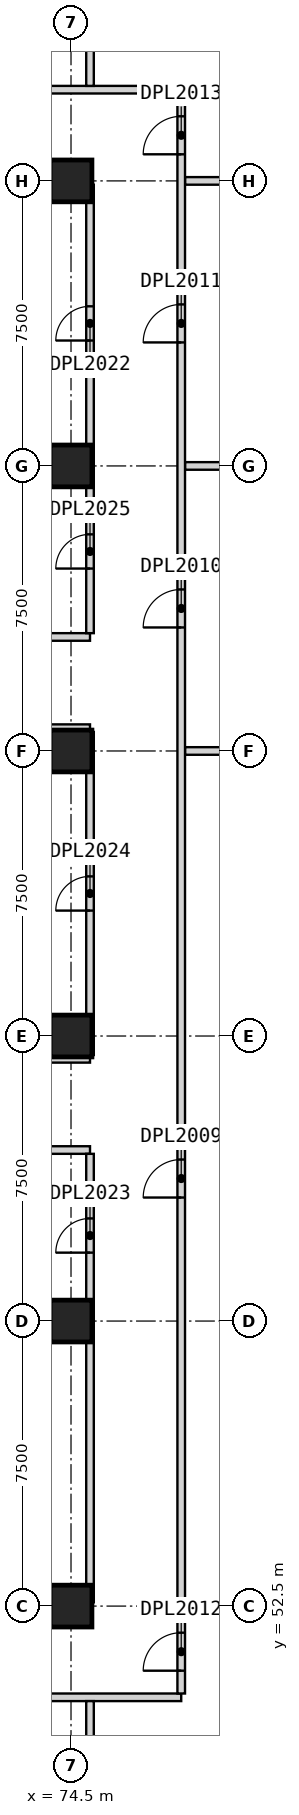
"""IFC4 building model, lengths in metres.
Left out: names, types, materials, properties, quantities, classifications, styles, units other than length and angle.
Written with IfcOpenShell. Run it as: python <this file> out.ifc"""

import sys

from ifc_helpers import new_model, si_unit, direction, frame, frame_2d, origin, origin_2d, place, context, subcontext, project, spatial, rectangle, extrude, element, fill, save


model = new_model("IFC4")
c1 = context("Model", 3, precision=1e-05, world=origin(), true_north=direction((0.0, 1.0)))
c2 = subcontext(c1, "Body", "Model", "MODEL_VIEW")
j1 = project(units=[si_unit("LENGTHUNIT", "METRE"), si_unit("PLANEANGLEUNIT", "RADIAN")], contexts=[c1])
p1 = place(None, origin())
s1 = spatial("IfcSite", under=j1, at=p1, CompositionType="ELEMENT")
p2 = place(p1, origin())
s2 = spatial("IfcBuilding", under=s1, at=p2, CompositionType="ELEMENT")
p3 = place(p2, frame((0.0, 0.0, 118.7)))
s3 = spatial("IfcBuildingStorey", under=s2, at=p3, CompositionType="ELEMENT", Elevation=118.7)
for number, where, z_axis, x_axis in (
    (1, (74.5, 52.5, 0.0), (0.0, 0.0, 1.0), (1.0, 0.0, 0.0)),
    (2, (74.5, 60.0, 0.0), (0.0, 0.0, 1.0), (1.0, 0.0, 0.0)),
    (3, (74.5, 67.5, 0.0), (0.0, 0.0, 1.0), (1.0, 0.0, 0.0)),
    (4, (74.5, 75.0, 0.0), (0.0, 0.0, 1.0), (1.0, 0.0, 0.0)),
    (5, (74.5, 82.5, 0.0), (0.0, 0.0, 1.0), (1.0, 0.0, 0.0)),
    (6, (74.5, 90.0, 0.0), (0.0, 0.0, 1.0), (1.0, 0.0, 0.0)),
):
    element("IfcColumn", number, at=place(p3, frame(where, z_axis=z_axis, x_axis=x_axis)), inside=s3, PredefinedType="COLUMN", context=c2, shape_type="SweptSolid", body=[
        extrude(rectangle(XDim=1.1, YDim=1.1, at=origin_2d()), origin(), (0.0, 0.0, 1.0), 5.5),
    ])
p4 = place(p3, frame((30.81, 50.1, 0.0), z_axis=(0.0, 0.0, 1.0), x_axis=(1.0, 0.0, 0.0)))
e7 = element("IfcWall", 7, at=p4, inside=s3, PredefinedType="PARTITIONING", context=c2, shape_type="SweptSolid", body=[
    extrude(rectangle(XDim=46.59, YDim=0.2, at=frame_2d((23.295, 0.0))), origin(), (0.0, 0.0, 1.0), 5.2),
])
p5 = place(p4, frame((8.065, 0.0, 0.0)))
e8 = element("IfcOpeningElement", 8, at=p5, cuts=e7, PredefinedType="OPENING", context=c2, shape_type="SweptSolid", body=[
    extrude(rectangle(XDim=1.0, YDim=2.1, at=frame_2d((0.5, 1.05))), frame((0.0, 0.11, 0.0), z_axis=(0.0, -1.0, 0.0), x_axis=(1.0, 0.0, 0.0)), (0.0, 0.0, 1.0), 0.22),
])
p6 = place(p4, frame((15.565, 0.0, 0.0)))
e9 = element("IfcOpeningElement", 9, at=p6, cuts=e7, PredefinedType="OPENING", context=c2, shape_type="SweptSolid", body=[
    extrude(rectangle(XDim=1.0, YDim=2.1, at=frame_2d((0.5, 1.05))), frame((0.0, 0.11, 0.0), z_axis=(0.0, -1.0, 0.0), x_axis=(1.0, 0.0, 0.0)), (0.0, 0.0, 1.0), 0.22),
])
p7 = place(p4, frame((24.94, 0.0, 0.0)))
e10 = element("IfcOpeningElement", 10, at=p7, cuts=e7, PredefinedType="OPENING", context=c2, shape_type="SweptSolid", body=[
    extrude(rectangle(XDim=1.0, YDim=2.1, at=frame_2d((0.5, 1.05))), frame((0.0, 0.11, 0.0), z_axis=(0.0, -1.0, 0.0), x_axis=(1.0, 0.0, 0.0)), (0.0, 0.0, 1.0), 0.22),
])
p8 = place(p4, frame((38.065, 0.0, 0.0)))
e11 = element("IfcOpeningElement", 11, at=p8, cuts=e7, PredefinedType="OPENING", context=c2, shape_type="SweptSolid", body=[
    extrude(rectangle(XDim=1.0, YDim=2.1, at=frame_2d((0.5, 1.05))), frame((0.0, 0.11, 0.0), z_axis=(0.0, -1.0, 0.0), x_axis=(1.0, 0.0, 0.0)), (0.0, 0.0, 1.0), 0.22),
])
p9 = place(p3, frame((60.0, 52.5, 0.0), z_axis=(0.0, 0.0, 1.0), x_axis=(1.0, 0.0, 0.0)))
e12 = element("IfcWall", 12, at=p9, inside=s3, PredefinedType="PARTITIONING", context=c2, shape_type="SweptSolid", body=[
    extrude(rectangle(XDim=15.0, YDim=0.2, at=frame_2d((7.5, 0.0))), origin(), (0.0, 0.0, 1.0), 5.2),
])
p10 = place(p9, frame((2.925, 0.0, 0.0)))
e13 = element("IfcOpeningElement", 13, at=p10, cuts=e12, PredefinedType="OPENING", context=c2, shape_type="SweptSolid", body=[
    extrude(rectangle(XDim=0.9, YDim=2.1, at=frame_2d((0.45, 1.05))), frame((0.0, 0.11, 0.0), z_axis=(0.0, -1.0, 0.0), x_axis=(1.0, 0.0, 0.0)), (0.0, 0.0, 1.0), 0.22),
])
p11 = place(p9, frame((11.525, 0.0, 0.0)))
e14 = element("IfcOpeningElement", 14, at=p11, cuts=e12, PredefinedType="OPENING", context=c2, shape_type="SweptSolid", body=[
    extrude(rectangle(XDim=0.9, YDim=2.1, at=frame_2d((0.45, 1.05))), frame((0.0, 0.11, 0.0), z_axis=(0.0, -1.0, 0.0), x_axis=(1.0, 0.0, 0.0)), (0.0, 0.0, 1.0), 0.22),
])
p12 = place(p3, frame((77.5, 52.5, 0.0), z_axis=(0.0, 0.0, 1.0), x_axis=(1.0, 0.0, 0.0)))
e15 = element("IfcWall", 15, at=p12, inside=s3, PredefinedType="PARTITIONING", context=c2, shape_type="SweptSolid", body=[
    extrude(rectangle(XDim=12.5, YDim=0.2, at=frame_2d((6.25, 0.0))), origin(), (0.0, 0.0, 1.0), 4.0),
])
p13 = place(p3, frame((60.0, 60.0, 0.0), z_axis=(0.0, 0.0, 1.0), x_axis=(1.0, 0.0, 0.0)))
e16 = element("IfcWall", 16, at=p13, inside=s3, PredefinedType="PARTITIONING", context=c2, shape_type="SweptSolid", body=[
    extrude(rectangle(XDim=14.9, YDim=0.2, at=frame_2d((7.45, 0.0))), origin(), (0.0, 0.0, 1.0), 5.2),
])
for number, where, z_axis, x_axis in (
    (17, (60.0, 64.5, 0.0), (0.0, 0.0, 1.0), (1.0, 0.0, 0.0)),
    (18, (60.0, 66.9, 0.0), (0.0, 0.0, 1.0), (1.0, 0.0, 0.0)),
):
    element("IfcWall", number, at=place(p3, frame(where, z_axis=z_axis, x_axis=x_axis)), inside=s3, PredefinedType="PARTITIONING", context=c2, shape_type="SweptSolid", body=[
        extrude(rectangle(XDim=15.0, YDim=0.2, at=frame_2d((7.5, 0.0))), origin(), (0.0, 0.0, 1.0), 5.2),
    ])
p14 = place(p3, frame((77.5, 75.0, 0.0), z_axis=(0.0, 0.0, 1.0), x_axis=(1.0, 0.0, 0.0)))
e19 = element("IfcWall", 19, at=p14, inside=s3, PredefinedType="PARTITIONING", context=c2, shape_type="SweptSolid", body=[
    extrude(rectangle(XDim=12.5, YDim=0.2, at=frame_2d((6.25, 0.0))), origin(), (0.0, 0.0, 1.0), 4.0),
])
for number, where, z_axis, x_axis in (
    (20, (60.0, 75.6, 0.0), (0.0, 0.0, 1.0), (1.0, 0.0, 0.0)),
    (21, (60.0, 78.0, 0.0), (0.0, 0.0, 1.0), (1.0, 0.0, 0.0)),
):
    element("IfcWall", number, at=place(p3, frame(where, z_axis=z_axis, x_axis=x_axis)), inside=s3, PredefinedType="PARTITIONING", context=c2, shape_type="SweptSolid", body=[
        extrude(rectangle(XDim=15.0, YDim=0.2, at=frame_2d((7.5, 0.0))), origin(), (0.0, 0.0, 1.0), 5.2),
    ])
p15 = place(p3, frame((60.0, 82.5, 0.0), z_axis=(0.0, 0.0, 1.0), x_axis=(1.0, 0.0, 0.0)))
e22 = element("IfcWall", 22, at=p15, inside=s3, PredefinedType="PARTITIONING", context=c2, shape_type="SweptSolid", body=[
    extrude(rectangle(XDim=14.9, YDim=0.2, at=frame_2d((7.45, 0.0))), origin(), (0.0, 0.0, 1.0), 5.2),
])
p16 = place(p3, frame((77.5, 82.5, 0.0), z_axis=(0.0, 0.0, 1.0), x_axis=(1.0, 0.0, 0.0)))
e23 = element("IfcWall", 23, at=p16, inside=s3, PredefinedType="PARTITIONING", context=c2, shape_type="SweptSolid", body=[
    extrude(rectangle(XDim=12.5, YDim=0.2, at=frame_2d((6.25, 0.0))), origin(), (0.0, 0.0, 1.0), 4.0),
])
p17 = place(p3, frame((30.0, 90.0, 0.0), z_axis=(0.0, 0.0, 1.0), x_axis=(1.0, 0.0, 0.0)))
e24 = element("IfcWall", 24, at=p17, inside=s3, PredefinedType="PARTITIONING", context=c2, shape_type="SweptSolid", body=[
    extrude(rectangle(XDim=45.0, YDim=0.2, at=frame_2d((22.5, 0.0))), origin(), (0.0, 0.0, 1.0), 5.2),
])
p18 = place(p17, frame((11.175, 0.0, 0.0)))
e25 = element("IfcOpeningElement", 25, at=p18, cuts=e24, PredefinedType="OPENING", context=c2, shape_type="SweptSolid", body=[
    extrude(rectangle(XDim=0.9, YDim=2.1, at=frame_2d((0.45, 1.05))), frame((0.0, 0.11, 0.0), z_axis=(0.0, -1.0, 0.0), x_axis=(1.0, 0.0, 0.0)), (0.0, 0.0, 1.0), 0.22),
])
p19 = place(p17, frame((24.6, 0.0, 0.0)))
e26 = element("IfcOpeningElement", 26, at=p19, cuts=e24, PredefinedType="OPENING", context=c2, shape_type="SweptSolid", body=[
    extrude(rectangle(XDim=0.9, YDim=2.1, at=frame_2d((0.45, 1.05))), frame((0.0, 0.11, 0.0), z_axis=(0.0, -1.0, 0.0), x_axis=(1.0, 0.0, 0.0)), (0.0, 0.0, 1.0), 0.22),
])
p20 = place(p17, frame((32.1, 0.0, 0.0)))
e27 = element("IfcOpeningElement", 27, at=p20, cuts=e24, PredefinedType="OPENING", context=c2, shape_type="SweptSolid", body=[
    extrude(rectangle(XDim=0.9, YDim=2.1, at=frame_2d((0.45, 1.05))), frame((0.0, 0.11, 0.0), z_axis=(0.0, -1.0, 0.0), x_axis=(1.0, 0.0, 0.0)), (0.0, 0.0, 1.0), 0.22),
])
p21 = place(p3, frame((77.5, 90.0, 0.0), z_axis=(0.0, 0.0, 1.0), x_axis=(1.0, 0.0, 0.0)))
e28 = element("IfcWall", 28, at=p21, inside=s3, PredefinedType="PARTITIONING", context=c2, shape_type="SweptSolid", body=[
    extrude(rectangle(XDim=12.5, YDim=0.2, at=frame_2d((6.25, 0.0))), origin(), (0.0, 0.0, 1.0), 4.0),
])
p22 = place(p3, frame((30.81, 92.4, 0.0), z_axis=(0.0, 0.0, 1.0), x_axis=(1.0, 0.0, 0.0)))
e29 = element("IfcWall", 29, at=p22, inside=s3, PredefinedType="PARTITIONING", context=c2, shape_type="SweptSolid", body=[
    extrude(rectangle(XDim=46.59, YDim=0.2, at=frame_2d((23.295, 0.0))), origin(), (0.0, 0.0, 1.0), 5.2),
])
p23 = place(p22, frame((6.19, 0.0, 0.0)))
e30 = element("IfcOpeningElement", 30, at=p23, cuts=e29, PredefinedType="OPENING", context=c2, shape_type="SweptSolid", body=[
    extrude(rectangle(XDim=1.0, YDim=2.1, at=frame_2d((0.5, 1.05))), frame((0.0, 0.11, 0.0), z_axis=(0.0, -1.0, 0.0), x_axis=(1.0, 0.0, 0.0)), (0.0, 0.0, 1.0), 0.22),
])
p24 = place(p22, frame((15.565, 0.0, 0.0)))
e31 = element("IfcOpeningElement", 31, at=p24, cuts=e29, PredefinedType="OPENING", context=c2, shape_type="SweptSolid", body=[
    extrude(rectangle(XDim=1.0, YDim=2.1, at=frame_2d((0.5, 1.05))), frame((0.0, 0.11, 0.0), z_axis=(0.0, -1.0, 0.0), x_axis=(1.0, 0.0, 0.0)), (0.0, 0.0, 1.0), 0.22),
])
p25 = place(p22, frame((23.065, 0.0, 0.0)))
e32 = element("IfcOpeningElement", 32, at=p25, cuts=e29, PredefinedType="OPENING", context=c2, shape_type="SweptSolid", body=[
    extrude(rectangle(XDim=1.0, YDim=2.1, at=frame_2d((0.5, 1.05))), frame((0.0, 0.11, 0.0), z_axis=(0.0, -1.0, 0.0), x_axis=(1.0, 0.0, 0.0)), (0.0, 0.0, 1.0), 0.22),
])
p26 = place(p22, frame((36.19, 0.0, 0.0)))
e33 = element("IfcOpeningElement", 33, at=p26, cuts=e29, PredefinedType="OPENING", context=c2, shape_type="SweptSolid", body=[
    extrude(rectangle(XDim=1.0, YDim=2.1, at=frame_2d((0.5, 1.05))), frame((0.0, 0.11, 0.0), z_axis=(0.0, -1.0, 0.0), x_axis=(1.0, 0.0, 0.0)), (0.0, 0.0, 1.0), 0.22),
])
p27 = place(p3, frame((75.0, 38.31, 0.0), z_axis=(0.0, 0.0, 1.0), x_axis=(0.0, 1.0, 0.0)))
e34 = element("IfcWall", 34, at=p27, inside=s3, PredefinedType="PARTITIONING", context=c2, shape_type="SweptSolid", body=[
    extrude(rectangle(XDim=11.69, YDim=0.2, at=frame_2d((5.845, 0.0))), origin(), (0.0, 0.0, 1.0), 5.2),
])
p28 = place(p3, frame((75.0, 52.6, 0.0), z_axis=(0.0, 0.0, 1.0), x_axis=(0.0, 1.0, 0.0)))
e35 = element("IfcWall", 35, at=p28, inside=s3, PredefinedType="PARTITIONING", context=c2, shape_type="SweptSolid", body=[
    extrude(rectangle(XDim=11.8, YDim=0.2, at=frame_2d((5.9, 0.0))), origin(), (0.0, 0.0, 1.0), 5.2),
])
p29 = place(p28, frame((9.2, 0.0, 0.0)))
e36 = element("IfcOpeningElement", 36, at=p29, cuts=e35, PredefinedType="OPENING", context=c2, shape_type="SweptSolid", body=[
    extrude(rectangle(XDim=0.9, YDim=2.1, at=frame_2d((0.45, 1.05))), frame((0.0, 0.11, 0.0), z_axis=(0.0, -1.0, 0.0), x_axis=(1.0, 0.0, 0.0)), (0.0, 0.0, 1.0), 0.22),
])
p30 = place(p3, frame((75.0, 67.0, 0.0), z_axis=(0.0, 0.0, 1.0), x_axis=(0.0, 1.0, 0.0)))
e37 = element("IfcWall", 37, at=p30, inside=s3, PredefinedType="PARTITIONING", context=c2, shape_type="SweptSolid", body=[
    extrude(rectangle(XDim=8.5, YDim=0.2, at=frame_2d((4.25, 0.0))), origin(), (0.0, 0.0, 1.0), 5.2),
])
p31 = place(p30, frame((3.8, 0.0, 0.0)))
e38 = element("IfcOpeningElement", 38, at=p31, cuts=e37, PredefinedType="OPENING", context=c2, shape_type="SweptSolid", body=[
    extrude(rectangle(XDim=0.9, YDim=2.1, at=frame_2d((0.45, 1.05))), frame((0.0, 0.11, 0.0), z_axis=(0.0, -1.0, 0.0), x_axis=(1.0, 0.0, 0.0)), (0.0, 0.0, 1.0), 0.22),
])
p32 = place(p3, frame((75.0, 78.1, 0.0), z_axis=(0.0, 0.0, 1.0), x_axis=(0.0, 1.0, 0.0)))
e39 = element("IfcWall", 39, at=p32, inside=s3, PredefinedType="PARTITIONING", context=c2, shape_type="SweptSolid", body=[
    extrude(rectangle(XDim=11.8, YDim=0.2, at=frame_2d((5.9, 0.0))), origin(), (0.0, 0.0, 1.0), 5.2),
])
p33 = place(p32, frame((7.7, 0.0, 0.0)))
e40 = element("IfcOpeningElement", 40, at=p33, cuts=e39, PredefinedType="OPENING", context=c2, shape_type="SweptSolid", body=[
    extrude(rectangle(XDim=0.9, YDim=2.1, at=frame_2d((0.45, 1.05))), frame((0.0, 0.11, 0.0), z_axis=(0.0, -1.0, 0.0), x_axis=(1.0, 0.0, 0.0)), (0.0, 0.0, 1.0), 0.22),
])
p34 = place(p32, frame((1.7, 0.0, 0.0)))
e41 = element("IfcOpeningElement", 41, at=p34, cuts=e39, PredefinedType="OPENING", context=c2, shape_type="SweptSolid", body=[
    extrude(rectangle(XDim=0.9, YDim=2.1, at=frame_2d((0.45, 1.05))), frame((0.0, 0.11, 0.0), z_axis=(0.0, -1.0, 0.0), x_axis=(1.0, 0.0, 0.0)), (0.0, 0.0, 1.0), 0.22),
])
p35 = place(p3, frame((75.0, 92.5, 0.0), z_axis=(0.0, 0.0, 1.0), x_axis=(0.0, 1.0, 0.0)))
e42 = element("IfcWall", 42, at=p35, inside=s3, PredefinedType="PARTITIONING", context=c2, shape_type="SweptSolid", body=[
    extrude(rectangle(XDim=11.69, YDim=0.2, at=frame_2d((5.845, 0.0))), origin(), (0.0, 0.0, 1.0), 4.0),
])
p36 = place(p3, frame((77.4, 50.2, 0.0), z_axis=(0.0, 0.0, 1.0), x_axis=(0.0, 1.0, 0.0)))
e43 = element("IfcWall", 43, at=p36, inside=s3, PredefinedType="PARTITIONING", context=c2, shape_type="SweptSolid", body=[
    extrude(rectangle(XDim=42.1, YDim=0.2, at=frame_2d((21.05, 0.0))), origin(), (0.0, 0.0, 1.0), 5.2),
])
p37 = place(p36, frame((13.05, 0.0, 0.0)))
e44 = element("IfcOpeningElement", 44, at=p37, cuts=e43, PredefinedType="OPENING", context=c2, shape_type="SweptSolid", body=[
    extrude(rectangle(XDim=1.0, YDim=2.1, at=frame_2d((0.5, 1.05))), frame((0.0, 0.11, 0.0), z_axis=(0.0, -1.0, 0.0), x_axis=(1.0, 0.0, 0.0)), (0.0, 0.0, 1.0), 0.22),
])
p38 = place(p36, frame((28.05, 0.0, 0.0)))
e45 = element("IfcOpeningElement", 45, at=p38, cuts=e43, PredefinedType="OPENING", context=c2, shape_type="SweptSolid", body=[
    extrude(rectangle(XDim=1.0, YDim=2.1, at=frame_2d((0.5, 1.05))), frame((0.0, 0.11, 0.0), z_axis=(0.0, -1.0, 0.0), x_axis=(1.0, 0.0, 0.0)), (0.0, 0.0, 1.0), 0.22),
])
p39 = place(p36, frame((35.55, 0.0, 0.0)))
e46 = element("IfcOpeningElement", 46, at=p39, cuts=e43, PredefinedType="OPENING", context=c2, shape_type="SweptSolid", body=[
    extrude(rectangle(XDim=1.0, YDim=2.1, at=frame_2d((0.5, 1.05))), frame((0.0, 0.11, 0.0), z_axis=(0.0, -1.0, 0.0), x_axis=(1.0, 0.0, 0.0)), (0.0, 0.0, 1.0), 0.22),
])
p40 = place(p36, frame((0.6, 0.0, 0.0)))
e47 = element("IfcOpeningElement", 47, at=p40, cuts=e43, PredefinedType="OPENING", context=c2, shape_type="SweptSolid", body=[
    extrude(rectangle(XDim=1.0, YDim=2.1, at=frame_2d((0.5, 1.05))), frame((0.0, 0.11, 0.0), z_axis=(0.0, -1.0, 0.0), x_axis=(1.0, 0.0, 0.0)), (0.0, 0.0, 1.0), 0.22),
])
p41 = place(p36, frame((40.5, 0.0, 0.0)))
e48 = element("IfcOpeningElement", 48, at=p41, cuts=e43, PredefinedType="OPENING", context=c2, shape_type="SweptSolid", body=[
    extrude(rectangle(XDim=1.0, YDim=2.1, at=frame_2d((0.5, 1.05))), frame((0.0, 0.11, 0.0), z_axis=(0.0, -1.0, 0.0), x_axis=(1.0, 0.0, 0.0)), (0.0, 0.0, 1.0), 0.22),
])
p42 = place(p37, origin())
e49 = element("IfcDoor", 49, at=p42, inside=s3, OperationType="SINGLE_SWING_RIGHT", PredefinedType="DOOR", context=c2, shape_type="SweptSolid", body=[
    extrude(rectangle(XDim=1.0, YDim=2.1, at=frame_2d((0.5, 1.05))), frame((0.0, 0.025, 0.0), z_axis=(0.0, -1.0, 0.0), x_axis=(1.0, 0.0, 0.0)), (0.0, 0.0, 1.0), 0.05),
])
fill(e44, e49)
p43 = place(p38, origin())
e50 = element("IfcDoor", 50, at=p43, inside=s3, OperationType="SINGLE_SWING_RIGHT", PredefinedType="DOOR", context=c2, shape_type="SweptSolid", body=[
    extrude(rectangle(XDim=1.0, YDim=2.1, at=frame_2d((0.5, 1.05))), frame((0.0, 0.025, 0.0), z_axis=(0.0, -1.0, 0.0), x_axis=(1.0, 0.0, 0.0)), (0.0, 0.0, 1.0), 0.05),
])
fill(e45, e50)
p44 = place(p39, origin())
e51 = element("IfcDoor", 51, at=p44, inside=s3, OperationType="SINGLE_SWING_RIGHT", PredefinedType="DOOR", context=c2, shape_type="SweptSolid", body=[
    extrude(rectangle(XDim=1.0, YDim=2.1, at=frame_2d((0.5, 1.05))), frame((0.0, 0.025, 0.0), z_axis=(0.0, -1.0, 0.0), x_axis=(1.0, 0.0, 0.0)), (0.0, 0.0, 1.0), 0.05),
])
fill(e46, e51)
p45 = place(p40, origin())
e52 = element("IfcDoor", 52, at=p45, inside=s3, OperationType="SINGLE_SWING_LEFT", PredefinedType="DOOR", context=c2, shape_type="SweptSolid", body=[
    extrude(rectangle(XDim=1.0, YDim=2.1, at=frame_2d((0.5, 1.05))), frame((0.0, 0.025, 0.0), z_axis=(0.0, -1.0, 0.0), x_axis=(1.0, 0.0, 0.0)), (0.0, 0.0, 1.0), 0.05),
])
fill(e47, e52)
p46 = place(p41, origin())
e53 = element("IfcDoor", 53, at=p46, inside=s3, OperationType="SINGLE_SWING_LEFT", PredefinedType="DOOR", context=c2, shape_type="SweptSolid", body=[
    extrude(rectangle(XDim=1.0, YDim=2.1, at=frame_2d((0.5, 1.05))), frame((0.0, 0.025, 0.0), z_axis=(0.0, -1.0, 0.0), x_axis=(1.0, 0.0, 0.0)), (0.0, 0.0, 1.0), 0.05),
])
fill(e48, e53)
p47 = place(p33, origin())
e54 = element("IfcDoor", 54, at=p47, inside=s3, OperationType="SINGLE_SWING_LEFT", PredefinedType="DOOR", context=c2, shape_type="SweptSolid", body=[
    extrude(rectangle(XDim=0.9, YDim=2.1, at=frame_2d((0.45, 1.05))), frame((0.0, 0.025, 0.0), z_axis=(0.0, -1.0, 0.0), x_axis=(1.0, 0.0, 0.0)), (0.0, 0.0, 1.0), 0.05),
])
fill(e40, e54)
p48 = place(p29, origin())
e55 = element("IfcDoor", 55, at=p48, inside=s3, OperationType="SINGLE_SWING_LEFT", PredefinedType="DOOR", context=c2, shape_type="SweptSolid", body=[
    extrude(rectangle(XDim=0.9, YDim=2.1, at=frame_2d((0.45, 1.05))), frame((0.0, 0.025, 0.0), z_axis=(0.0, -1.0, 0.0), x_axis=(1.0, 0.0, 0.0)), (0.0, 0.0, 1.0), 0.05),
])
fill(e36, e55)
p49 = place(p31, origin())
e56 = element("IfcDoor", 56, at=p49, inside=s3, OperationType="SINGLE_SWING_LEFT", PredefinedType="DOOR", context=c2, shape_type="SweptSolid", body=[
    extrude(rectangle(XDim=0.9, YDim=2.1, at=frame_2d((0.45, 1.05))), frame((0.0, 0.025, 0.0), z_axis=(0.0, -1.0, 0.0), x_axis=(1.0, 0.0, 0.0)), (0.0, 0.0, 1.0), 0.05),
])
fill(e38, e56)
p50 = place(p34, origin())
e57 = element("IfcDoor", 57, at=p50, inside=s3, OperationType="SINGLE_SWING_LEFT", PredefinedType="DOOR", context=c2, shape_type="SweptSolid", body=[
    extrude(rectangle(XDim=0.9, YDim=2.1, at=frame_2d((0.45, 1.05))), frame((0.0, 0.025, 0.0), z_axis=(0.0, -1.0, 0.0), x_axis=(1.0, 0.0, 0.0)), (0.0, 0.0, 1.0), 0.05),
])
fill(e41, e57)
save(model, sys.argv[1])
